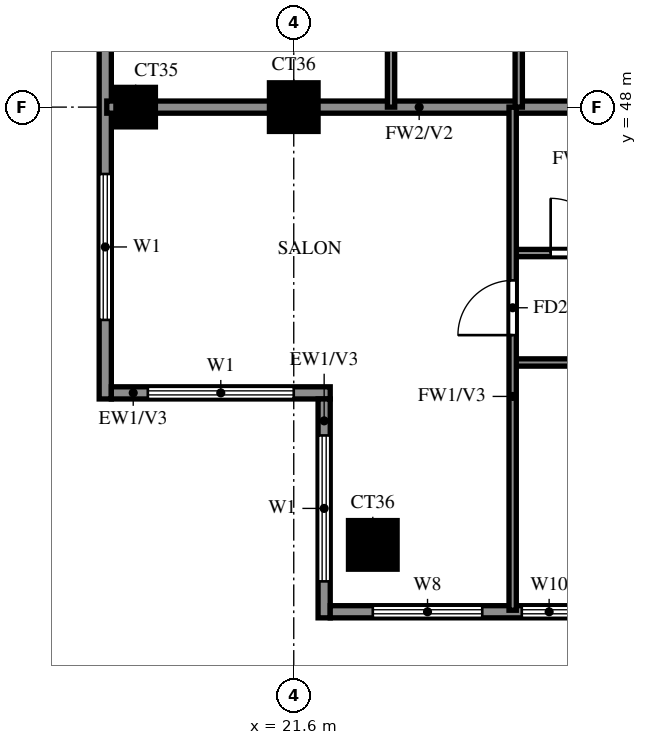
"""IFC4 building model, lengths in metres.
Left out: names, types, materials, properties, quantities, classifications, styles, units other than length and angle.
Written with IfcOpenShell. Run it as: python <this file> out.ifc"""

import sys

from ifc_helpers import new_model, si_unit, direction, frame, frame_2d, origin, origin_2d, place, context, subcontext, project, spatial, rectangle, extrude, source, transform, mapped, element, fill, save


model = new_model("IFC4")
c1 = context("Model", 3, precision=1e-05, world=origin(), true_north=direction((0.0, 1.0)))
c2 = subcontext(c1, "Body", "Model", "MODEL_VIEW")
j1 = project(units=[si_unit("LENGTHUNIT", "METRE"), si_unit("PLANEANGLEUNIT", "RADIAN")], contexts=[c1])
p1 = place(None, origin())
s1 = spatial("IfcSite", under=j1, at=p1, CompositionType="ELEMENT")
p2 = place(p1, origin())
s2 = spatial("IfcBuilding", under=s1, at=p2, CompositionType="ELEMENT")
p3 = place(p2, frame((0.0, 0.0, 239.5)))
s3 = spatial("IfcBuildingStorey", under=s2, at=p3, CompositionType="ELEMENT", Elevation=239.5)
m1 = source(origin(), c2, "Body", "SweptSolid", [
    extrude(rectangle(XDim=0.8, YDim=0.8, at=origin_2d()), origin(), (0.0, 0.0, 1.0), 3.22),
])
p4 = place(p3, frame((22.9, 40.8, 0.0), z_axis=(0.0, 0.0, 1.0), x_axis=(1.0, 0.0, 0.0)))
e1 = element("IfcColumn", 1, at=p4, inside=s3, PredefinedType="COLUMN", context=c2, shape_type="MappedRepresentation", body=[
    mapped(m1, transform((0.0, 0.0, 0.0))),
])
m2 = source(origin(), c2, "Body", "SweptSolid", [
    extrude(rectangle(XDim=0.65, YDim=0.65, at=origin_2d()), origin(), (0.0, 0.0, 1.0), 3.22),
])
p5 = place(p3, frame((19.0, 48.0, 0.0), z_axis=(0.0, 0.0, 1.0), x_axis=(1.0, 0.0, 0.0)))
e2 = element("IfcColumn", 2, at=p5, inside=s3, PredefinedType="COLUMN", context=c2, shape_type="MappedRepresentation", body=[
    mapped(m2, transform((0.0, 0.0, 0.0))),
])
p6 = place(p3, frame((21.6, 48.0, 0.0), z_axis=(0.0, 0.0, 1.0), x_axis=(1.0, 0.0, 0.0)))
e3 = element("IfcColumn", 3, at=p6, inside=s3, PredefinedType="COLUMN", context=c2, shape_type="MappedRepresentation", body=[
    mapped(m1, transform((0.0, 0.0, 0.0))),
])
p7 = place(p3, frame((18.5, 76.6, 0.0), z_axis=(0.0, 0.0, 1.0), x_axis=(0.0, -1.0, 0.0)))
e4 = element("IfcWall", 4, at=p7, inside=s3, PredefinedType="SOLIDWALL", context=c2, shape_type="SweptSolid", body=[
    extrude(rectangle(XDim=33.4, YDim=0.2, at=frame_2d((16.7, 0.0))), origin(), (0.0, 0.0, 1.0), 3.22),
])
p8 = place(p7, frame((4.3, 0.0, 0.0)))
e5 = element("IfcOpeningElement", 5, at=p8, cuts=e4, PredefinedType="OPENING", context=c2, shape_type="SweptSolid", body=[
    extrude(rectangle(XDim=1.8, YDim=2.4, at=frame_2d((0.9, 1.2))), frame((0.0, 0.11, 0.0), z_axis=(0.0, -1.0, 0.0), x_axis=(1.0, 0.0, 0.0)), (0.0, 0.0, 1.0), 0.22),
])
p9 = place(p7, frame((18.7, 0.0, 0.0)))
e6 = element("IfcOpeningElement", 6, at=p9, cuts=e4, PredefinedType="OPENING", context=c2, shape_type="SweptSolid", body=[
    extrude(rectangle(XDim=1.8, YDim=2.4, at=frame_2d((0.9, 1.2))), frame((0.0, 0.11, 0.0), z_axis=(0.0, -1.0, 0.0), x_axis=(1.0, 0.0, 0.0)), (0.0, 0.0, 1.0), 0.22),
])
p10 = place(p7, frame((29.7, 0.0, 0.6)))
e7 = element("IfcOpeningElement", 7, at=p10, cuts=e4, PredefinedType="OPENING", context=c2, shape_type="SweptSolid", body=[
    extrude(rectangle(XDim=2.4, YDim=2.4, at=frame_2d((1.2, 1.2))), frame((0.0, 0.11, 0.0), z_axis=(0.0, -1.0, 0.0), x_axis=(1.0, 0.0, 0.0)), (0.0, 0.0, 1.0), 0.22),
])
p11 = place(p7, frame((21.7, 0.0, 0.6)))
e8 = element("IfcOpeningElement", 8, at=p11, cuts=e4, PredefinedType="OPENING", context=c2, shape_type="SweptSolid", body=[
    extrude(rectangle(XDim=1.2, YDim=2.4, at=frame_2d((0.6, 1.2))), frame((0.0, 0.11, 0.0), z_axis=(0.0, -1.0, 0.0), x_axis=(1.0, 0.0, 0.0)), (0.0, 0.0, 1.0), 0.22),
])
p12 = place(p7, frame((25.0, 0.0, 0.6)))
e9 = element("IfcOpeningElement", 9, at=p12, cuts=e4, PredefinedType="OPENING", context=c2, shape_type="SweptSolid", body=[
    extrude(rectangle(XDim=2.4, YDim=2.4, at=frame_2d((1.2, 1.2))), frame((0.0, 0.11, 0.0), z_axis=(0.0, -1.0, 0.0), x_axis=(1.0, 0.0, 0.0)), (0.0, 0.0, 1.0), 0.22),
])
p13 = place(p7, frame((14.5, 0.0, 0.6)))
e10 = element("IfcOpeningElement", 10, at=p13, cuts=e4, PredefinedType="OPENING", context=c2, shape_type="SweptSolid", body=[
    extrude(rectangle(XDim=1.8, YDim=2.4, at=frame_2d((0.9, 1.2))), frame((0.0, 0.11, 0.0), z_axis=(0.0, -1.0, 0.0), x_axis=(1.0, 0.0, 0.0)), (0.0, 0.0, 1.0), 0.22),
])
p14 = place(p7, frame((11.2, 0.0, 0.6)))
e11 = element("IfcOpeningElement", 11, at=p14, cuts=e4, PredefinedType="OPENING", context=c2, shape_type="SweptSolid", body=[
    extrude(rectangle(XDim=2.4, YDim=2.4, at=frame_2d((1.2, 1.2))), frame((0.0, 0.11, 0.0), z_axis=(0.0, -1.0, 0.0), x_axis=(1.0, 0.0, 0.0)), (0.0, 0.0, 1.0), 0.22),
])
p15 = place(p7, frame((7.3, 0.0, 0.6)))
e12 = element("IfcOpeningElement", 12, at=p15, cuts=e4, PredefinedType="OPENING", context=c2, shape_type="SweptSolid", body=[
    extrude(rectangle(XDim=1.2, YDim=2.4, at=frame_2d((0.6, 1.2))), frame((0.0, 0.11, 0.0), z_axis=(0.0, -1.0, 0.0), x_axis=(1.0, 0.0, 0.0)), (0.0, 0.0, 1.0), 0.22),
])
p16 = place(p7, frame((9.55, 0.0, 0.6)))
e13 = element("IfcOpeningElement", 13, at=p16, cuts=e4, PredefinedType="OPENING", context=c2, shape_type="SweptSolid", body=[
    extrude(rectangle(XDim=0.9, YDim=2.4, at=frame_2d((0.45, 1.2))), frame((0.0, 0.11, 0.0), z_axis=(0.0, -1.0, 0.0), x_axis=(1.0, 0.0, 0.0)), (0.0, 0.0, 1.0), 0.22),
])
p17 = place(p7, frame((0.6, 0.0, 0.6)))
e14 = element("IfcOpeningElement", 14, at=p17, cuts=e4, PredefinedType="OPENING", context=c2, shape_type="SweptSolid", body=[
    extrude(rectangle(XDim=1.2, YDim=2.4, at=frame_2d((0.6, 1.2))), frame((0.0, 0.11, 0.0), z_axis=(0.0, -1.0, 0.0), x_axis=(1.0, 0.0, 0.0)), (0.0, 0.0, 1.0), 0.22),
])
p18 = place(p3, frame((18.6, 43.3, 0.0), z_axis=(0.0, 0.0, 1.0), x_axis=(1.0, 0.0, 0.0)))
e15 = element("IfcWall", 15, at=p18, inside=s3, PredefinedType="SOLIDWALL", context=c2, shape_type="SweptSolid", body=[
    extrude(rectangle(XDim=3.6, YDim=0.2, at=frame_2d((1.8, 0.0))), origin(), (0.0, 0.0, 1.0), 3.22),
])
p19 = place(p18, frame((0.6, 0.0, 0.6)))
e16 = element("IfcOpeningElement", 16, at=p19, cuts=e15, PredefinedType="OPENING", context=c2, shape_type="SweptSolid", body=[
    extrude(rectangle(XDim=2.4, YDim=2.4, at=frame_2d((1.2, 1.2))), frame((0.0, 0.11, 0.0), z_axis=(0.0, -1.0, 0.0), x_axis=(1.0, 0.0, 0.0)), (0.0, 0.0, 1.0), 0.22),
])
p20 = place(p3, frame((22.1, 43.2, 0.0), z_axis=(0.0, 0.0, 1.0), x_axis=(0.0, -1.0, 0.0)))
e17 = element("IfcWall", 17, at=p20, inside=s3, PredefinedType="SOLIDWALL", context=c2, shape_type="SweptSolid", body=[
    extrude(rectangle(XDim=3.6, YDim=0.2, at=frame_2d((1.8, 0.0))), origin(), (0.0, 0.0, 1.0), 3.22),
])
p21 = place(p20, frame((0.6, 0.0, 0.6)))
e18 = element("IfcOpeningElement", 18, at=p21, cuts=e17, PredefinedType="OPENING", context=c2, shape_type="SweptSolid", body=[
    extrude(rectangle(XDim=2.4, YDim=2.4, at=frame_2d((1.2, 1.2))), frame((0.0, 0.11, 0.0), z_axis=(0.0, -1.0, 0.0), x_axis=(1.0, 0.0, 0.0)), (0.0, 0.0, 1.0), 0.22),
])
p22 = place(p3, frame((22.2, 39.7, 0.0), z_axis=(0.0, 0.0, 1.0), x_axis=(1.0, 0.0, 0.0)))
e19 = element("IfcWall", 19, at=p22, inside=s3, PredefinedType="SOLIDWALL", context=c2, shape_type="SweptSolid", body=[
    extrude(rectangle(XDim=19.8, YDim=0.2, at=frame_2d((9.9, 0.0))), origin(), (0.0, 0.0, 1.0), 3.22),
])
p23 = place(p22, frame((7.5, 0.0, 0.0)))
e20 = element("IfcOpeningElement", 20, at=p23, cuts=e19, PredefinedType="OPENING", context=c2, shape_type="SweptSolid", body=[
    extrude(rectangle(XDim=1.8, YDim=2.4, at=frame_2d((0.9, 1.2))), frame((0.0, 0.11, 0.0), z_axis=(0.0, -1.0, 0.0), x_axis=(1.0, 0.0, 0.0)), (0.0, 0.0, 1.0), 0.22),
])
p24 = place(p22, frame((0.7, 0.0, 0.6)))
e21 = element("IfcOpeningElement", 21, at=p24, cuts=e19, PredefinedType="OPENING", context=c2, shape_type="SweptSolid", body=[
    extrude(rectangle(XDim=1.8, YDim=2.4, at=frame_2d((0.9, 1.2))), frame((0.0, 0.11, 0.0), z_axis=(0.0, -1.0, 0.0), x_axis=(1.0, 0.0, 0.0)), (0.0, 0.0, 1.0), 0.22),
])
p25 = place(p22, frame((3.15, 0.0, 0.6)))
e22 = element("IfcOpeningElement", 22, at=p25, cuts=e19, PredefinedType="OPENING", context=c2, shape_type="SweptSolid", body=[
    extrude(rectangle(XDim=0.9, YDim=2.4, at=frame_2d((0.45, 1.2))), frame((0.0, 0.11, 0.0), z_axis=(0.0, -1.0, 0.0), x_axis=(1.0, 0.0, 0.0)), (0.0, 0.0, 1.0), 0.22),
])
p26 = place(p22, frame((5.1, 0.0, 0.6)))
e23 = element("IfcOpeningElement", 23, at=p26, cuts=e19, PredefinedType="OPENING", context=c2, shape_type="SweptSolid", body=[
    extrude(rectangle(XDim=1.2, YDim=2.4, at=frame_2d((0.6, 1.2))), frame((0.0, 0.11, 0.0), z_axis=(0.0, -1.0, 0.0), x_axis=(1.0, 0.0, 0.0)), (0.0, 0.0, 1.0), 0.22),
])
p27 = place(p22, frame((9.75, 0.0, 0.6)))
e24 = element("IfcOpeningElement", 24, at=p27, cuts=e19, PredefinedType="OPENING", context=c2, shape_type="SweptSolid", body=[
    extrude(rectangle(XDim=0.9, YDim=2.4, at=frame_2d((0.45, 1.2))), frame((0.0, 0.11, 0.0), z_axis=(0.0, -1.0, 0.0), x_axis=(1.0, 0.0, 0.0)), (0.0, 0.0, 1.0), 0.22),
])
p28 = place(p3, frame((18.525, 48.0, 0.0), z_axis=(0.0, 0.0, 1.0), x_axis=(1.0, 0.0, 0.0)))
e25 = element("IfcWall", 25, at=p28, inside=s3, PredefinedType="SOLIDWALL", context=c2, shape_type="SweptSolid", body=[
    extrude(rectangle(XDim=10.275, YDim=0.2, at=frame_2d((5.138, 0.0))), origin(), (0.0, 0.0, 1.0), 3.22),
])
p29 = place(p3, frame((25.2, 43.8, 0.0), z_axis=(0.0, 0.0, 1.0), x_axis=(1.0, 0.0, 0.0)))
e26 = element("IfcWall", 26, at=p29, inside=s3, PredefinedType="PARTITIONING", context=c2, shape_type="SweptSolid", body=[
    extrude(rectangle(XDim=8.4, YDim=0.12, at=frame_2d((4.2, 0.0))), origin(), (0.0, 0.0, 1.0), 3.22),
])
p30 = place(p29, frame((1.35, 0.0, 0.0)))
e27 = element("IfcOpeningElement", 27, at=p30, cuts=e26, PredefinedType="OPENING", context=c2, shape_type="SweptSolid", body=[
    extrude(rectangle(XDim=0.9, YDim=2.1, at=frame_2d((0.45, 1.05))), frame((0.0, 0.07, 0.0), z_axis=(0.0, -1.0, 0.0), x_axis=(1.0, 0.0, 0.0)), (0.0, 0.0, 1.0), 0.14),
])
p31 = place(p29, frame((5.55, 0.0, 0.0)))
e28 = element("IfcOpeningElement", 28, at=p31, cuts=e26, PredefinedType="OPENING", context=c2, shape_type="SweptSolid", body=[
    extrude(rectangle(XDim=0.9, YDim=2.1, at=frame_2d((0.45, 1.05))), frame((0.0, 0.07, 0.0), z_axis=(0.0, -1.0, 0.0), x_axis=(1.0, 0.0, 0.0)), (0.0, 0.0, 1.0), 0.14),
])
p32 = place(p3, frame((25.2, 45.6, 0.0), z_axis=(0.0, 0.0, 1.0), x_axis=(1.0, 0.0, 0.0)))
e29 = element("IfcWall", 29, at=p32, inside=s3, PredefinedType="PARTITIONING", context=c2, shape_type="SweptSolid", body=[
    extrude(rectangle(XDim=6.0, YDim=0.12, at=frame_2d((3.0, 0.0))), origin(), (0.0, 0.0, 1.0), 3.22),
])
p33 = place(p32, frame((0.625, 0.0, 0.0)))
e30 = element("IfcOpeningElement", 30, at=p33, cuts=e29, PredefinedType="OPENING", context=c2, shape_type="SweptSolid", body=[
    extrude(rectangle(XDim=0.9, YDim=2.1, at=frame_2d((0.45, 1.05))), frame((0.0, 0.07, 0.0), z_axis=(0.0, -1.0, 0.0), x_axis=(1.0, 0.0, 0.0)), (0.0, 0.0, 1.0), 0.14),
])
p34 = place(p32, frame((3.625, 0.0, 0.0)))
e31 = element("IfcOpeningElement", 31, at=p34, cuts=e29, PredefinedType="OPENING", context=c2, shape_type="SweptSolid", body=[
    extrude(rectangle(XDim=0.9, YDim=2.1, at=frame_2d((0.45, 1.05))), frame((0.0, 0.07, 0.0), z_axis=(0.0, -1.0, 0.0), x_axis=(1.0, 0.0, 0.0)), (0.0, 0.0, 1.0), 0.14),
])
p35 = place(p3, frame((23.2, 48.0, 0.0), z_axis=(0.0, 0.0, 1.0), x_axis=(0.0, 1.0, 0.0)))
e32 = element("IfcWall", 32, at=p35, inside=s3, PredefinedType="PARTITIONING", context=c2, shape_type="SweptSolid", body=[
    extrude(rectangle(XDim=25.2, YDim=0.12, at=frame_2d((12.6, 0.0))), origin(), (0.0, 0.0, 1.0), 3.22),
])
p36 = place(p35, frame((2.85, 0.0, 0.0)))
e33 = element("IfcOpeningElement", 33, at=p36, cuts=e32, PredefinedType="OPENING", context=c2, shape_type="SweptSolid", body=[
    extrude(rectangle(XDim=1.5, YDim=2.1, at=frame_2d((0.75, 1.05))), frame((0.0, 0.07, 0.0), z_axis=(0.0, -1.0, 0.0), x_axis=(1.0, 0.0, 0.0)), (0.0, 0.0, 1.0), 0.14),
])
p37 = place(p35, frame((8.55, 0.0, 0.0)))
e34 = element("IfcOpeningElement", 34, at=p37, cuts=e32, PredefinedType="OPENING", context=c2, shape_type="SweptSolid", body=[
    extrude(rectangle(XDim=0.9, YDim=2.1, at=frame_2d((0.45, 1.05))), frame((0.0, 0.07, 0.0), z_axis=(0.0, -1.0, 0.0), x_axis=(1.0, 0.0, 0.0)), (0.0, 0.0, 1.0), 0.14),
])
p38 = place(p35, frame((12.15, 0.0, 0.0)))
e35 = element("IfcOpeningElement", 35, at=p38, cuts=e32, PredefinedType="OPENING", context=c2, shape_type="SweptSolid", body=[
    extrude(rectangle(XDim=0.9, YDim=2.1, at=frame_2d((0.45, 1.05))), frame((0.0, 0.07, 0.0), z_axis=(0.0, -1.0, 0.0), x_axis=(1.0, 0.0, 0.0)), (0.0, 0.0, 1.0), 0.14),
])
p39 = place(p35, frame((15.75, 0.0, 0.0)))
e36 = element("IfcOpeningElement", 36, at=p39, cuts=e32, PredefinedType="OPENING", context=c2, shape_type="SweptSolid", body=[
    extrude(rectangle(XDim=0.9, YDim=2.1, at=frame_2d((0.45, 1.05))), frame((0.0, 0.07, 0.0), z_axis=(0.0, -1.0, 0.0), x_axis=(1.0, 0.0, 0.0)), (0.0, 0.0, 1.0), 0.14),
])
p40 = place(p35, frame((19.35, 0.0, 0.0)))
e37 = element("IfcOpeningElement", 37, at=p40, cuts=e32, PredefinedType="OPENING", context=c2, shape_type="SweptSolid", body=[
    extrude(rectangle(XDim=0.9, YDim=2.1, at=frame_2d((0.45, 1.05))), frame((0.0, 0.07, 0.0), z_axis=(0.0, -1.0, 0.0), x_axis=(1.0, 0.0, 0.0)), (0.0, 0.0, 1.0), 0.14),
])
p41 = place(p35, frame((22.95, 0.0, 0.0)))
e38 = element("IfcOpeningElement", 38, at=p41, cuts=e32, PredefinedType="OPENING", context=c2, shape_type="SweptSolid", body=[
    extrude(rectangle(XDim=0.9, YDim=2.1, at=frame_2d((0.45, 1.05))), frame((0.0, 0.07, 0.0), z_axis=(0.0, -1.0, 0.0), x_axis=(1.0, 0.0, 0.0)), (0.0, 0.0, 1.0), 0.14),
])
p42 = place(p3, frame((25.2, 39.725, 0.0), z_axis=(0.0, 0.0, 1.0), x_axis=(0.0, 1.0, 0.0)))
e39 = element("IfcWall", 39, at=p42, inside=s3, PredefinedType="PARTITIONING", context=c2, shape_type="SweptSolid", body=[
    extrude(rectangle(XDim=8.275, YDim=0.12, at=frame_2d((4.137, 0.0))), origin(), (0.0, 0.0, 1.0), 3.22),
])
p43 = place(p42, frame((4.525, 0.0, 0.0)))
e40 = element("IfcOpeningElement", 40, at=p43, cuts=e39, PredefinedType="OPENING", context=c2, shape_type="SweptSolid", body=[
    extrude(rectangle(XDim=0.9, YDim=2.1, at=frame_2d((0.45, 1.05))), frame((0.0, 0.07, 0.0), z_axis=(0.0, -1.0, 0.0), x_axis=(1.0, 0.0, 0.0)), (0.0, 0.0, 1.0), 0.14),
])
p44 = place(p3, frame((25.3, 48.0, 0.0), z_axis=(0.0, 0.0, 1.0), x_axis=(0.0, 1.0, 0.0)))
e41 = element("IfcWall", 41, at=p44, inside=s3, PredefinedType="PARTITIONING", context=c2, shape_type="SweptSolid", body=[
    extrude(rectangle(XDim=2.4, YDim=0.12, at=frame_2d((1.2, 0.0))), origin(), (0.0, 0.0, 1.0), 3.22),
])
p45 = place(p10, origin())
e42 = element("IfcWindow", 42, at=p45, inside=s3, PartitioningType="DOUBLE_PANEL_VERTICAL", PredefinedType="WINDOW", context=c2, shape_type="SweptSolid", body=[
    extrude(rectangle(XDim=2.4, YDim=2.4, at=frame_2d((1.2, 1.2))), frame((0.0, 0.03, 0.0), z_axis=(0.0, -1.0, 0.0), x_axis=(1.0, 0.0, 0.0)), (0.0, 0.0, 1.0), 0.06),
])
fill(e7, e42)
p46 = place(p19, origin())
e43 = element("IfcWindow", 43, at=p46, inside=s3, PartitioningType="DOUBLE_PANEL_VERTICAL", PredefinedType="WINDOW", context=c2, shape_type="SweptSolid", body=[
    extrude(rectangle(XDim=2.4, YDim=2.4, at=frame_2d((1.2, 1.2))), frame((0.0, 0.03, 0.0), z_axis=(0.0, -1.0, 0.0), x_axis=(1.0, 0.0, 0.0)), (0.0, 0.0, 1.0), 0.06),
])
fill(e16, e43)
p47 = place(p21, origin())
e44 = element("IfcWindow", 44, at=p47, inside=s3, PartitioningType="DOUBLE_PANEL_VERTICAL", PredefinedType="WINDOW", context=c2, shape_type="SweptSolid", body=[
    extrude(rectangle(XDim=2.4, YDim=2.4, at=frame_2d((1.2, 1.2))), frame((0.0, 0.03, 0.0), z_axis=(0.0, -1.0, 0.0), x_axis=(1.0, 0.0, 0.0)), (0.0, 0.0, 1.0), 0.06),
])
fill(e18, e44)
p48 = place(p24, origin())
e45 = element("IfcWindow", 45, at=p48, inside=s3, PartitioningType="DOUBLE_PANEL_VERTICAL", PredefinedType="WINDOW", context=c2, shape_type="SweptSolid", body=[
    extrude(rectangle(XDim=1.8, YDim=2.4, at=frame_2d((0.9, 1.2))), frame((0.0, 0.03, 0.0), z_axis=(0.0, -1.0, 0.0), x_axis=(1.0, 0.0, 0.0)), (0.0, 0.0, 1.0), 0.06),
])
fill(e21, e45)
p49 = place(p25, origin())
e46 = element("IfcWindow", 46, at=p49, inside=s3, PartitioningType="SINGLE_PANEL", PredefinedType="WINDOW", context=c2, shape_type="SweptSolid", body=[
    extrude(rectangle(XDim=0.9, YDim=2.4, at=frame_2d((0.45, 1.2))), frame((0.0, 0.03, 0.0), z_axis=(0.0, -1.0, 0.0), x_axis=(1.0, 0.0, 0.0)), (0.0, 0.0, 1.0), 0.06),
])
fill(e22, e46)
p50 = place(p43, origin())
e47 = element("IfcDoor", 47, at=p50, inside=s3, OperationType="SINGLE_SWING_LEFT", PredefinedType="DOOR", context=c2, shape_type="SweptSolid", body=[
    extrude(rectangle(XDim=0.9, YDim=2.1, at=frame_2d((0.45, 1.05))), frame((0.0, 0.025, 0.0), z_axis=(0.0, -1.0, 0.0), x_axis=(1.0, 0.0, 0.0)), (0.0, 0.0, 1.0), 0.05),
])
fill(e40, e47)
p51 = place(p33, origin())
e48 = element("IfcDoor", 48, at=p51, inside=s3, OperationType="SINGLE_SWING_LEFT", PredefinedType="DOOR", context=c2, shape_type="SweptSolid", body=[
    extrude(rectangle(XDim=0.9, YDim=2.1, at=frame_2d((0.45, 1.05))), frame((0.0, 0.025, 0.0), z_axis=(0.0, -1.0, 0.0), x_axis=(1.0, 0.0, 0.0)), (0.0, 0.0, 1.0), 0.05),
])
fill(e30, e48)
save(model, sys.argv[1])
